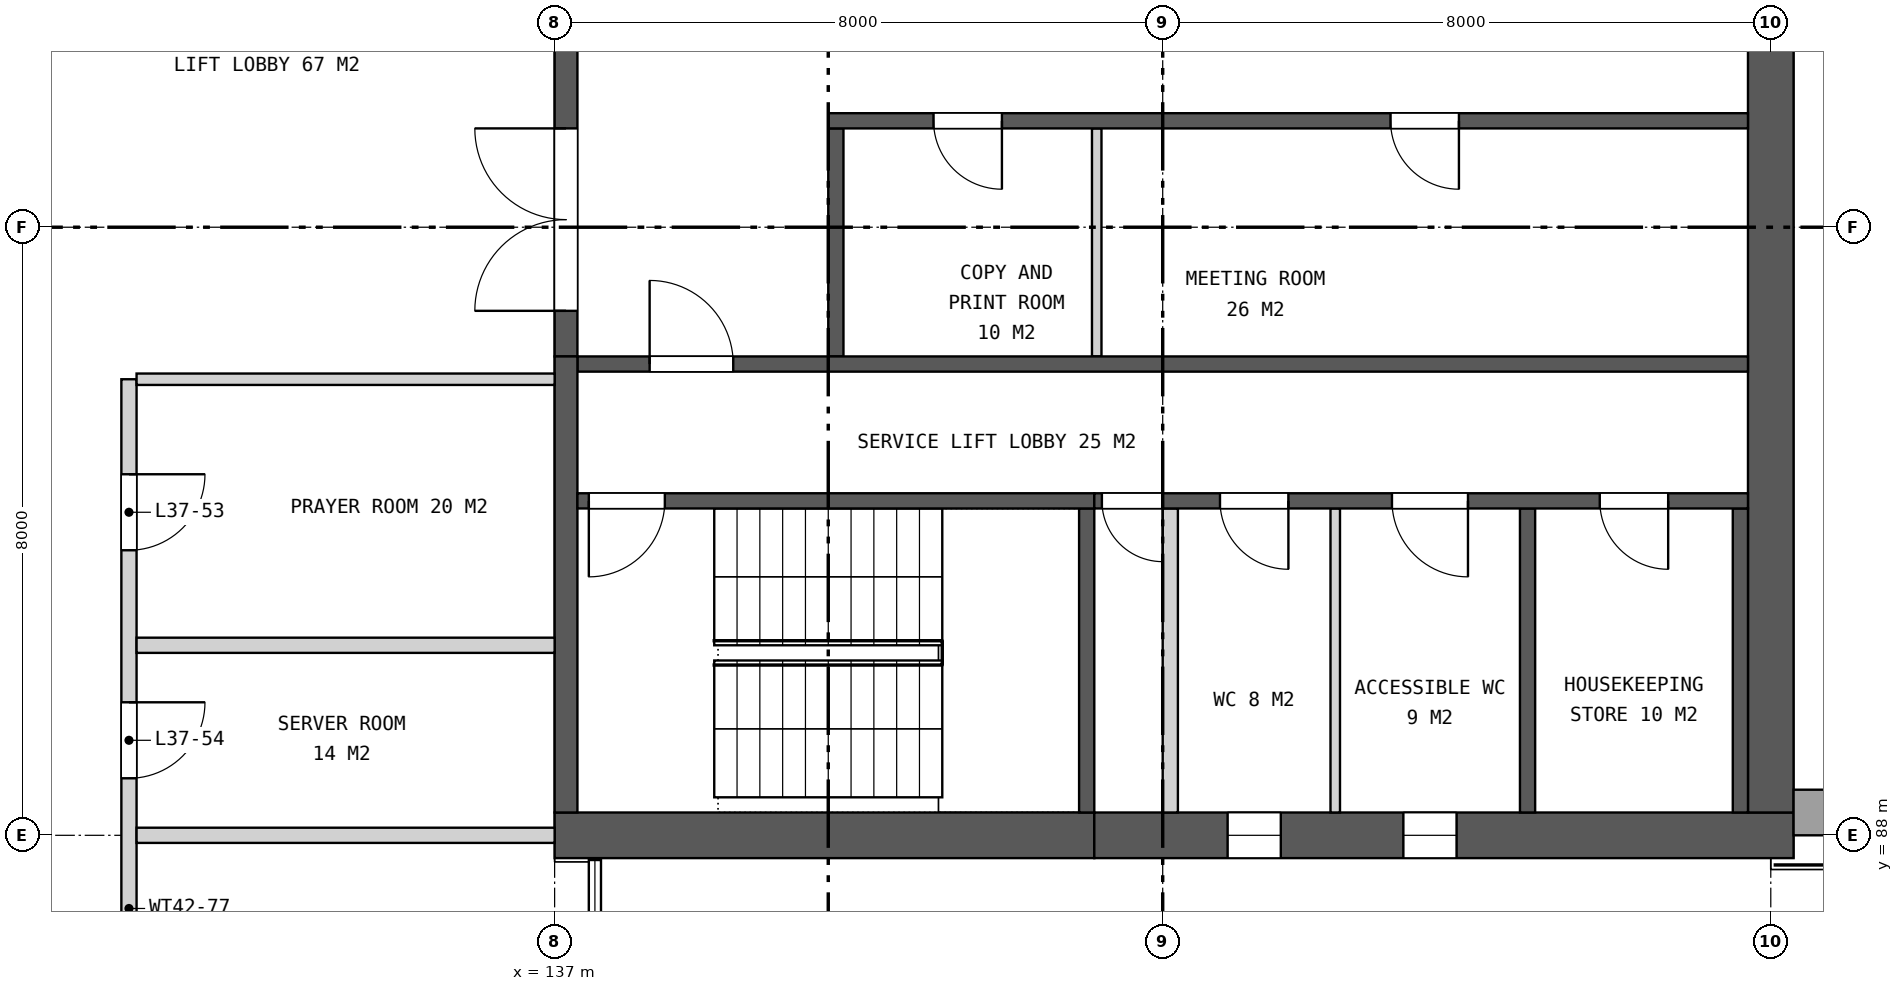
"""IFC4 building model, lengths in metres.
Left out: names, types, materials, properties, quantities, classifications, styles, units other than length and angle.
Written with IfcOpenShell. Run it as: python <this file> out.ifc"""

import sys

from ifc_helpers import new_model, si_unit, direction, frame, frame_2d, origin, place, context, subcontext, project, spatial, rectangle, extrude, element, fill, save


model = new_model("IFC4")
c1 = context("Model", 3, precision=1e-05, world=origin(), true_north=direction((0.0, 1.0)))
c2 = subcontext(c1, "Body", "Model", "MODEL_VIEW")
j1 = project(units=[si_unit("LENGTHUNIT", "METRE"), si_unit("PLANEANGLEUNIT", "RADIAN")], contexts=[c1])
p1 = place(None, origin())
s1 = spatial("IfcSite", under=j1, at=p1, CompositionType="ELEMENT")
p2 = place(p1, origin())
s2 = spatial("IfcBuilding", under=s1, at=p2, CompositionType="ELEMENT")
p3 = place(p2, frame((0.0, 0.0, 178.9)))
s3 = spatial("IfcBuildingStorey", under=s2, at=p3, CompositionType="ELEMENT", Elevation=178.9)
p4 = place(p3, frame((137.0, 88.0, 0.0), z_axis=(0.0, 0.0, 1.0), x_axis=(1.0, 0.0, 0.0)))
e1 = element("IfcWall", 1, at=p4, inside=s3, PredefinedType="SHEAR", context=c2, shape_type="SweptSolid", body=[
    extrude(rectangle(XDim=7.1, YDim=0.6, at=frame_2d((3.55, 0.0))), origin(), (0.0, 0.0, 1.0), 4.2),
])
p5 = place(p3, frame((144.1, 88.0, 0.0), z_axis=(0.0, 0.0, 1.0), x_axis=(1.0, 0.0, 0.0)))
e2 = element("IfcWall", 2, at=p5, inside=s3, PredefinedType="SHEAR", context=c2, shape_type="SweptSolid", body=[
    extrude(rectangle(XDim=9.2, YDim=0.6, at=frame_2d((4.6, 0.0))), origin(), (0.0, 0.0, 1.0), 4.2),
])
p6 = place(p5, frame((1.754, 0.0, 1.5)))
e3 = element("IfcOpeningElement", 3, at=p6, cuts=e2, PredefinedType="OPENING", context=c2, shape_type="SweptSolid", body=[
    extrude(rectangle(XDim=0.7, YDim=0.9, at=frame_2d((0.35, 0.45))), frame((0.0, 0.31, 0.0), z_axis=(0.0, -1.0, 0.0), x_axis=(1.0, 0.0, 0.0)), (0.0, 0.0, 1.0), 0.62),
])
p7 = place(p5, frame((4.066, 0.0, 1.5)))
e4 = element("IfcOpeningElement", 4, at=p7, cuts=e2, PredefinedType="OPENING", context=c2, shape_type="SweptSolid", body=[
    extrude(rectangle(XDim=0.7, YDim=0.9, at=frame_2d((0.35, 0.45))), frame((0.0, 0.31, 0.0), z_axis=(0.0, -1.0, 0.0), x_axis=(1.0, 0.0, 0.0)), (0.0, 0.0, 1.0), 0.62),
])
p8 = place(p3, frame((153.0, 88.3, 0.0), z_axis=(0.0, 0.0, 1.0), x_axis=(0.0, 1.0, 0.0)))
e5 = element("IfcWall", 5, at=p8, inside=s3, PredefinedType="SHEAR", context=c2, shape_type="SweptSolid", body=[
    extrude(rectangle(XDim=23.4, YDim=0.6, at=frame_2d((11.7, 0.0))), origin(), (0.0, 0.0, 1.0), 4.2),
])
p9 = place(p8, frame((10.5, 0.0, 0.0)))
e6 = element("IfcOpeningElement", 6, at=p9, cuts=e5, PredefinedType="OPENING", context=c2, shape_type="SweptSolid", body=[
    extrude(rectangle(XDim=2.4, YDim=2.4, at=frame_2d((1.2, 1.2))), frame((0.0, 0.31, 0.0), z_axis=(0.0, -1.0, 0.0), x_axis=(1.0, 0.0, 0.0)), (0.0, 0.0, 1.0), 0.62),
])
p10 = place(p8, frame((17.85, 0.0, 0.0)))
e7 = element("IfcOpeningElement", 7, at=p10, cuts=e5, PredefinedType="OPENING", context=c2, shape_type="SweptSolid", body=[
    extrude(rectangle(XDim=1.1, YDim=2.1, at=frame_2d((0.55, 1.05))), frame((0.0, 0.31, 0.0), z_axis=(0.0, -1.0, 0.0), x_axis=(1.0, 0.0, 0.0)), (0.0, 0.0, 1.0), 0.62),
])
p11 = place(p3, frame((137.15, 94.3, 0.0), z_axis=(0.0, 0.0, 1.0), x_axis=(0.0, 1.0, 0.0)))
e8 = element("IfcWall", 8, at=p11, inside=s3, PredefinedType="SHEAR", context=c2, shape_type="SweptSolid", body=[
    extrude(rectangle(XDim=11.4, YDim=0.3, at=frame_2d((5.7, 0.0))), origin(), (0.0, 0.0, 1.0), 4.2),
])
p12 = place(p11, frame((0.6, 0.0, 0.0)))
e9 = element("IfcOpeningElement", 9, at=p12, cuts=e8, PredefinedType="OPENING", context=c2, shape_type="SweptSolid", body=[
    extrude(rectangle(XDim=2.4, YDim=2.4, at=frame_2d((1.2, 1.2))), frame((0.0, 0.16, 0.0), z_axis=(0.0, -1.0, 0.0), x_axis=(1.0, 0.0, 0.0)), (0.0, 0.0, 1.0), 0.32),
])
p13 = place(p11, frame((4.5, 0.0, 0.0)))
e10 = element("IfcOpeningElement", 10, at=p13, cuts=e8, PredefinedType="OPENING", context=c2, shape_type="SweptSolid", body=[
    extrude(rectangle(XDim=2.4, YDim=2.4, at=frame_2d((1.2, 1.2))), frame((0.0, 0.16, 0.0), z_axis=(0.0, -1.0, 0.0), x_axis=(1.0, 0.0, 0.0)), (0.0, 0.0, 1.0), 0.32),
])
p14 = place(p11, frame((8.4, 0.0, 0.0)))
e11 = element("IfcOpeningElement", 11, at=p14, cuts=e8, PredefinedType="OPENING", context=c2, shape_type="SweptSolid", body=[
    extrude(rectangle(XDim=2.4, YDim=2.4, at=frame_2d((1.2, 1.2))), frame((0.0, 0.16, 0.0), z_axis=(0.0, -1.0, 0.0), x_axis=(1.0, 0.0, 0.0)), (0.0, 0.0, 1.0), 0.32),
])
p15 = place(p3, frame((140.7, 94.3, 0.0), z_axis=(0.0, 0.0, 1.0), x_axis=(0.0, 1.0, 0.0)))
e12 = element("IfcWall", 12, at=p15, inside=s3, PredefinedType="SHEAR", context=c2, shape_type="SweptSolid", body=[
    extrude(rectangle(XDim=3.0, YDim=0.2, at=frame_2d((1.5, 0.0))), origin(), (0.0, 0.0, 1.0), 4.2),
])
p16 = place(p3, frame((144.132, 94.3, 0.0), z_axis=(0.0, 0.0, 1.0), x_axis=(0.0, 1.0, 0.0)))
e13 = element("IfcWall", 13, at=p16, inside=s3, PredefinedType="PARTITIONING", context=c2, shape_type="SweptSolid", body=[
    extrude(rectangle(XDim=3.0, YDim=0.125, at=frame_2d((1.5, 0.0))), origin(), (0.0, 0.0, 1.0), 4.2),
])
p17 = place(p3, frame((140.6, 97.4, 0.0), z_axis=(0.0, 0.0, 1.0), x_axis=(1.0, 0.0, 0.0)))
e14 = element("IfcWall", 14, at=p17, inside=s3, PredefinedType="SHEAR", context=c2, shape_type="SweptSolid", body=[
    extrude(rectangle(XDim=12.1, YDim=0.2, at=frame_2d((6.05, 0.0))), origin(), (0.0, 0.0, 1.0), 4.2),
])
p18 = place(p17, frame((1.385, 0.0, 0.0)))
e15 = element("IfcOpeningElement", 15, at=p18, cuts=e14, PredefinedType="OPENING", context=c2, shape_type="SweptSolid", body=[
    extrude(rectangle(XDim=0.9, YDim=2.1, at=frame_2d((0.45, 1.05))), frame((0.0, 0.11, 0.0), z_axis=(0.0, -1.0, 0.0), x_axis=(1.0, 0.0, 0.0)), (0.0, 0.0, 1.0), 0.22),
])
p19 = place(p17, frame((7.397, 0.0, 0.0)))
e16 = element("IfcOpeningElement", 16, at=p19, cuts=e14, PredefinedType="OPENING", context=c2, shape_type="SweptSolid", body=[
    extrude(rectangle(XDim=0.9, YDim=2.1, at=frame_2d((0.45, 1.05))), frame((0.0, 0.11, 0.0), z_axis=(0.0, -1.0, 0.0), x_axis=(1.0, 0.0, 0.0)), (0.0, 0.0, 1.0), 0.22),
])
p20 = place(p3, frame((137.3, 94.2, 0.0), z_axis=(0.0, 0.0, 1.0), x_axis=(1.0, 0.0, 0.0)))
e17 = element("IfcWall", 17, at=p20, inside=s3, PredefinedType="SHEAR", context=c2, shape_type="SweptSolid", body=[
    extrude(rectangle(XDim=15.4, YDim=0.2, at=frame_2d((7.7, 0.0))), origin(), (0.0, 0.0, 1.0), 4.2),
])
p21 = place(p20, frame((0.95, 0.0, 0.0)))
e18 = element("IfcOpeningElement", 18, at=p21, cuts=e17, PredefinedType="OPENING", context=c2, shape_type="SweptSolid", body=[
    extrude(rectangle(XDim=1.1, YDim=2.1, at=frame_2d((0.55, 1.05))), frame((0.0, 0.11, 0.0), z_axis=(0.0, -1.0, 0.0), x_axis=(1.0, 0.0, 0.0)), (0.0, 0.0, 1.0), 0.22),
])
p22 = place(p3, frame((137.15, 88.3, 0.0), z_axis=(0.0, 0.0, 1.0), x_axis=(0.0, 1.0, 0.0)))
e19 = element("IfcWall", 19, at=p22, inside=s3, PredefinedType="SHEAR", context=c2, shape_type="SweptSolid", body=[
    extrude(rectangle(XDim=6.0, YDim=0.3, at=frame_2d((3.0, 0.0))), origin(), (0.0, 0.0, 1.0), 4.2),
])
for number, where, z_axis, x_axis in (
    (20, (144.0, 88.3, 0.0), (0.0, 0.0, 1.0), (0.0, 1.0, 0.0)),
    (21, (149.8, 88.3, 0.0), (0.0, 0.0, 1.0), (0.0, 1.0, 0.0)),
    (22, (152.6, 88.3, 0.0), (0.0, 0.0, 1.0), (0.0, 1.0, 0.0)),
):
    element("IfcWall", number, at=place(p3, frame(where, z_axis=z_axis, x_axis=x_axis)), inside=s3, PredefinedType="SHEAR", context=c2, shape_type="SweptSolid", body=[
        extrude(rectangle(XDim=4.0, YDim=0.2, at=frame_2d((2.0, 0.0))), origin(), (0.0, 0.0, 1.0), 4.2),
    ])
p23 = place(p3, frame((145.1, 88.3, 0.0), z_axis=(0.0, 0.0, 1.0), x_axis=(0.0, 1.0, 0.0)))
e23 = element("IfcWall", 23, at=p23, inside=s3, PredefinedType="PARTITIONING", context=c2, shape_type="SweptSolid", body=[
    extrude(rectangle(XDim=4.0, YDim=0.2, at=frame_2d((2.0, 0.0))), origin(), (0.0, 0.0, 1.0), 4.2),
])
p24 = place(p3, frame((147.27, 88.3, 0.0), z_axis=(0.0, 0.0, 1.0), x_axis=(0.0, 1.0, 0.0)))
e24 = element("IfcWall", 24, at=p24, inside=s3, PredefinedType="PARTITIONING", context=c2, shape_type="SweptSolid", body=[
    extrude(rectangle(XDim=4.0, YDim=0.125, at=frame_2d((2.0, 0.0))), origin(), (0.0, 0.0, 1.0), 4.2),
])
p25 = place(p3, frame((137.3, 92.4, 0.0), z_axis=(0.0, 0.0, 1.0), x_axis=(1.0, 0.0, 0.0)))
e25 = element("IfcWall", 25, at=p25, inside=s3, PredefinedType="SHEAR", context=c2, shape_type="SweptSolid", body=[
    extrude(rectangle(XDim=6.8, YDim=0.2, at=frame_2d((3.4, 0.0))), origin(), (0.0, 0.0, 1.0), 4.2),
])
p26 = place(p25, frame((0.15, 0.0, 0.0)))
e26 = element("IfcOpeningElement", 26, at=p26, cuts=e25, PredefinedType="OPENING", context=c2, shape_type="SweptSolid", body=[
    extrude(rectangle(XDim=1.0, YDim=2.1, at=frame_2d((0.5, 1.05))), frame((0.0, 0.11, 0.0), z_axis=(0.0, -1.0, 0.0), x_axis=(1.0, 0.0, 0.0)), (0.0, 0.0, 1.0), 0.22),
])
p27 = place(p3, frame((144.1, 92.4, 0.0), z_axis=(0.0, 0.0, 1.0), x_axis=(1.0, 0.0, 0.0)))
e27 = element("IfcWall", 27, at=p27, inside=s3, PredefinedType="SHEAR", context=c2, shape_type="SweptSolid", body=[
    extrude(rectangle(XDim=8.6, YDim=0.2, at=frame_2d((4.3, 0.0))), origin(), (0.0, 0.0, 1.0), 4.2),
])
p28 = place(p27, frame((0.1, 0.0, 0.0)))
e28 = element("IfcOpeningElement", 28, at=p28, cuts=e27, PredefinedType="OPENING", context=c2, shape_type="SweptSolid", body=[
    extrude(rectangle(XDim=0.8, YDim=2.1, at=frame_2d((0.4, 1.05))), frame((0.0, 0.11, 0.0), z_axis=(0.0, -1.0, 0.0), x_axis=(1.0, 0.0, 0.0)), (0.0, 0.0, 1.0), 0.22),
])
p29 = place(p27, frame((1.654, 0.0, 0.0)))
e29 = element("IfcOpeningElement", 29, at=p29, cuts=e27, PredefinedType="OPENING", context=c2, shape_type="SweptSolid", body=[
    extrude(rectangle(XDim=0.9, YDim=2.1, at=frame_2d((0.45, 1.05))), frame((0.0, 0.11, 0.0), z_axis=(0.0, -1.0, 0.0), x_axis=(1.0, 0.0, 0.0)), (0.0, 0.0, 1.0), 0.22),
])
p30 = place(p27, frame((3.916, 0.0, 0.0)))
e30 = element("IfcOpeningElement", 30, at=p30, cuts=e27, PredefinedType="OPENING", context=c2, shape_type="SweptSolid", body=[
    extrude(rectangle(XDim=1.0, YDim=2.1, at=frame_2d((0.5, 1.05))), frame((0.0, 0.11, 0.0), z_axis=(0.0, -1.0, 0.0), x_axis=(1.0, 0.0, 0.0)), (0.0, 0.0, 1.0), 0.22),
])
p31 = place(p27, frame((6.65, 0.0, 0.0)))
e31 = element("IfcOpeningElement", 31, at=p31, cuts=e27, PredefinedType="OPENING", context=c2, shape_type="SweptSolid", body=[
    extrude(rectangle(XDim=0.9, YDim=2.1, at=frame_2d((0.45, 1.05))), frame((0.0, 0.11, 0.0), z_axis=(0.0, -1.0, 0.0), x_axis=(1.0, 0.0, 0.0)), (0.0, 0.0, 1.0), 0.22),
])
p32 = place(p3, frame((160.4, 88.3, 0.0), z_axis=(0.0, 0.0, 1.0), x_axis=(-1.0, 0.0, 0.0)))
e32 = element("IfcWall", 32, at=p32, inside=s3, PredefinedType="SOLIDWALL", context=c2, shape_type="SweptSolid", body=[
    extrude(rectangle(XDim=7.1, YDim=0.6, at=frame_2d((3.55, 0.0))), origin(), (0.0, 0.0, 1.0), 0.6),
])
p33 = place(p3, frame((131.4, 80.075, 0.0), z_axis=(0.0, 0.0, 1.0), x_axis=(0.0, 1.0, 0.0)))
e33 = element("IfcWall", 33, at=p33, inside=s3, PredefinedType="SOLIDWALL", context=c2, shape_type="SweptSolid", body=[
    extrude(rectangle(XDim=13.925, YDim=0.2, at=frame_2d((6.962, 0.0))), origin(), (0.0, 0.0, 1.0), 3.44),
])
p34 = place(p33, frame((11.675, 0.0, 0.0)))
e34 = element("IfcOpeningElement", 34, at=p34, cuts=e33, PredefinedType="OPENING", context=c2, shape_type="SweptSolid", body=[
    extrude(rectangle(XDim=1.0, YDim=2.1, at=frame_2d((0.5, 1.05))), frame((0.0, 0.11, 0.0), z_axis=(0.0, -1.0, 0.0), x_axis=(1.0, 0.0, 0.0)), (0.0, 0.0, 1.0), 0.22),
])
p35 = place(p33, frame((8.675, 0.0, 0.0)))
e35 = element("IfcOpeningElement", 35, at=p35, cuts=e33, PredefinedType="OPENING", context=c2, shape_type="SweptSolid", body=[
    extrude(rectangle(XDim=1.0, YDim=2.1, at=frame_2d((0.5, 1.05))), frame((0.0, 0.11, 0.0), z_axis=(0.0, -1.0, 0.0), x_axis=(1.0, 0.0, 0.0)), (0.0, 0.0, 1.0), 0.22),
])
p36 = place(p33, frame((3.45, 0.0, 0.0)))
e36 = element("IfcOpeningElement", 36, at=p36, cuts=e33, PredefinedType="OPENING", context=c2, shape_type="SweptSolid", body=[
    extrude(rectangle(XDim=1.0, YDim=2.1, at=frame_2d((0.5, 1.05))), frame((0.0, 0.11, 0.0), z_axis=(0.0, -1.0, 0.0), x_axis=(1.0, 0.0, 0.0)), (0.0, 0.0, 1.0), 0.22),
])
for number, where, z_axis, x_axis in (
    (37, (131.5, 88.0, 0.0), (0.0, 0.0, 1.0), (1.0, 0.0, 0.0)),
    (38, (131.5, 90.5, 0.0), (0.0, 0.0, 1.0), (1.0, 0.0, 0.0)),
):
    element("IfcWall", number, at=place(p3, frame(where, z_axis=z_axis, x_axis=x_axis)), inside=s3, PredefinedType="SOLIDWALL", context=c2, shape_type="SweptSolid", body=[
        extrude(rectangle(XDim=5.5, YDim=0.2, at=frame_2d((2.75, 0.0))), origin(), (0.0, 0.0, 1.0), 3.44),
    ])
p37 = place(p3, frame((131.5, 94.0, 0.0), z_axis=(0.0, 0.0, 1.0), x_axis=(1.0, 0.0, 0.0)))
e39 = element("IfcWall", 39, at=p37, inside=s3, PredefinedType="PARTITIONING", context=c2, shape_type="SweptSolid", body=[
    extrude(rectangle(XDim=5.5, YDim=0.15, at=frame_2d((2.75, 0.0))), origin(), (0.0, 0.0, 1.0), 3.44),
])
p38 = place(p6, origin())
e40 = element("IfcWindow", 40, at=p38, inside=s3, PartitioningType="SINGLE_PANEL", PredefinedType="WINDOW", context=c2, shape_type="SweptSolid", body=[
    extrude(rectangle(XDim=0.7, YDim=0.9, at=frame_2d((0.35, 0.45))), frame((0.0, 0.03, 0.0), z_axis=(0.0, -1.0, 0.0), x_axis=(1.0, 0.0, 0.0)), (0.0, 0.0, 1.0), 0.06),
])
fill(e3, e40)
p39 = place(p7, origin())
e41 = element("IfcWindow", 41, at=p39, inside=s3, PartitioningType="SINGLE_PANEL", PredefinedType="WINDOW", context=c2, shape_type="SweptSolid", body=[
    extrude(rectangle(XDim=0.7, YDim=0.9, at=frame_2d((0.35, 0.45))), frame((0.0, 0.03, 0.0), z_axis=(0.0, -1.0, 0.0), x_axis=(1.0, 0.0, 0.0)), (0.0, 0.0, 1.0), 0.06),
])
fill(e4, e41)
p40 = place(p12, origin())
e42 = element("IfcDoor", 42, at=p40, inside=s3, OperationType="DOUBLE_DOOR_SINGLE_SWING", PredefinedType="DOOR", context=c2, shape_type="SweptSolid", body=[
    extrude(rectangle(XDim=2.4, YDim=2.4, at=frame_2d((1.2, 1.2))), frame((0.0, 0.025, 0.0), z_axis=(0.0, -1.0, 0.0), x_axis=(1.0, 0.0, 0.0)), (0.0, 0.0, 1.0), 0.05),
])
fill(e9, e42)
p41 = place(p18, frame((0.9, 0.0, 0.0), z_axis=(0.0, 0.0, 1.0), x_axis=(-1.0, 0.0, 0.0)))
e43 = element("IfcDoor", 43, at=p41, inside=s3, OperationType="SINGLE_SWING_LEFT", PredefinedType="DOOR", context=c2, shape_type="SweptSolid", body=[
    extrude(rectangle(XDim=0.9, YDim=2.1, at=frame_2d((0.45, 1.05))), frame((0.0, 0.025, 0.0), z_axis=(0.0, -1.0, 0.0), x_axis=(1.0, 0.0, 0.0)), (0.0, 0.0, 1.0), 0.05),
])
fill(e15, e43)
p42 = place(p19, frame((0.9, 0.0, 0.0), z_axis=(0.0, 0.0, 1.0), x_axis=(-1.0, 0.0, 0.0)))
e44 = element("IfcDoor", 44, at=p42, inside=s3, OperationType="SINGLE_SWING_LEFT", PredefinedType="DOOR", context=c2, shape_type="SweptSolid", body=[
    extrude(rectangle(XDim=0.9, YDim=2.1, at=frame_2d((0.45, 1.05))), frame((0.0, 0.025, 0.0), z_axis=(0.0, -1.0, 0.0), x_axis=(1.0, 0.0, 0.0)), (0.0, 0.0, 1.0), 0.05),
])
fill(e16, e44)
p43 = place(p21, origin())
e45 = element("IfcDoor", 45, at=p43, inside=s3, OperationType="SINGLE_SWING_LEFT", PredefinedType="DOOR", context=c2, shape_type="SweptSolid", body=[
    extrude(rectangle(XDim=1.1, YDim=2.1, at=frame_2d((0.55, 1.05))), frame((0.0, 0.025, 0.0), z_axis=(0.0, -1.0, 0.0), x_axis=(1.0, 0.0, 0.0)), (0.0, 0.0, 1.0), 0.05),
])
fill(e18, e45)
p44 = place(p26, frame((1.0, 0.0, 0.0), z_axis=(0.0, 0.0, 1.0), x_axis=(-1.0, 0.0, 0.0)))
e46 = element("IfcDoor", 46, at=p44, inside=s3, OperationType="SINGLE_SWING_RIGHT", PredefinedType="DOOR", context=c2, shape_type="SweptSolid", body=[
    extrude(rectangle(XDim=1.0, YDim=2.1, at=frame_2d((0.5, 1.05))), frame((0.0, 0.025, 0.0), z_axis=(0.0, -1.0, 0.0), x_axis=(1.0, 0.0, 0.0)), (0.0, 0.0, 1.0), 0.05),
])
fill(e26, e46)
p45 = place(p28, frame((0.8, 0.0, 0.0), z_axis=(0.0, 0.0, 1.0), x_axis=(-1.0, 0.0, 0.0)))
e47 = element("IfcDoor", 47, at=p45, inside=s3, OperationType="SINGLE_SWING_LEFT", PredefinedType="DOOR", context=c2, shape_type="SweptSolid", body=[
    extrude(rectangle(XDim=0.8, YDim=2.1, at=frame_2d((0.4, 1.05))), frame((0.0, 0.025, 0.0), z_axis=(0.0, -1.0, 0.0), x_axis=(1.0, 0.0, 0.0)), (0.0, 0.0, 1.0), 0.05),
])
fill(e28, e47)
p46 = place(p29, frame((0.9, 0.0, 0.0), z_axis=(0.0, 0.0, 1.0), x_axis=(-1.0, 0.0, 0.0)))
e48 = element("IfcDoor", 48, at=p46, inside=s3, OperationType="SINGLE_SWING_LEFT", PredefinedType="DOOR", context=c2, shape_type="SweptSolid", body=[
    extrude(rectangle(XDim=0.9, YDim=2.1, at=frame_2d((0.45, 1.05))), frame((0.0, 0.025, 0.0), z_axis=(0.0, -1.0, 0.0), x_axis=(1.0, 0.0, 0.0)), (0.0, 0.0, 1.0), 0.05),
])
fill(e29, e48)
p47 = place(p30, frame((1.0, 0.0, 0.0), z_axis=(0.0, 0.0, 1.0), x_axis=(-1.0, 0.0, 0.0)))
e49 = element("IfcDoor", 49, at=p47, inside=s3, OperationType="SINGLE_SWING_LEFT", PredefinedType="DOOR", context=c2, shape_type="SweptSolid", body=[
    extrude(rectangle(XDim=1.0, YDim=2.1, at=frame_2d((0.5, 1.05))), frame((0.0, 0.025, 0.0), z_axis=(0.0, -1.0, 0.0), x_axis=(1.0, 0.0, 0.0)), (0.0, 0.0, 1.0), 0.05),
])
fill(e30, e49)
p48 = place(p31, frame((0.9, 0.0, 0.0), z_axis=(0.0, 0.0, 1.0), x_axis=(-1.0, 0.0, 0.0)))
e50 = element("IfcDoor", 50, at=p48, inside=s3, OperationType="SINGLE_SWING_LEFT", PredefinedType="DOOR", context=c2, shape_type="SweptSolid", body=[
    extrude(rectangle(XDim=0.9, YDim=2.1, at=frame_2d((0.45, 1.05))), frame((0.0, 0.025, 0.0), z_axis=(0.0, -1.0, 0.0), x_axis=(1.0, 0.0, 0.0)), (0.0, 0.0, 1.0), 0.05),
])
fill(e31, e50)
p49 = place(p34, frame((1.0, 0.0, 0.0), z_axis=(0.0, 0.0, 1.0), x_axis=(-1.0, 0.0, 0.0)))
e51 = element("IfcDoor", 51, at=p49, inside=s3, OperationType="SINGLE_SWING_LEFT", PredefinedType="DOOR", context=c2, shape_type="SweptSolid", body=[
    extrude(rectangle(XDim=1.0, YDim=2.1, at=frame_2d((0.5, 1.05))), frame((0.0, 0.025, 0.0), z_axis=(0.0, -1.0, 0.0), x_axis=(1.0, 0.0, 0.0)), (0.0, 0.0, 1.0), 0.05),
])
fill(e34, e51)
p50 = place(p35, frame((1.0, 0.0, 0.0), z_axis=(0.0, 0.0, 1.0), x_axis=(-1.0, 0.0, 0.0)))
e52 = element("IfcDoor", 52, at=p50, inside=s3, OperationType="SINGLE_SWING_LEFT", PredefinedType="DOOR", context=c2, shape_type="SweptSolid", body=[
    extrude(rectangle(XDim=1.0, YDim=2.1, at=frame_2d((0.5, 1.05))), frame((0.0, 0.025, 0.0), z_axis=(0.0, -1.0, 0.0), x_axis=(1.0, 0.0, 0.0)), (0.0, 0.0, 1.0), 0.05),
])
fill(e35, e52)
save(model, sys.argv[1])
